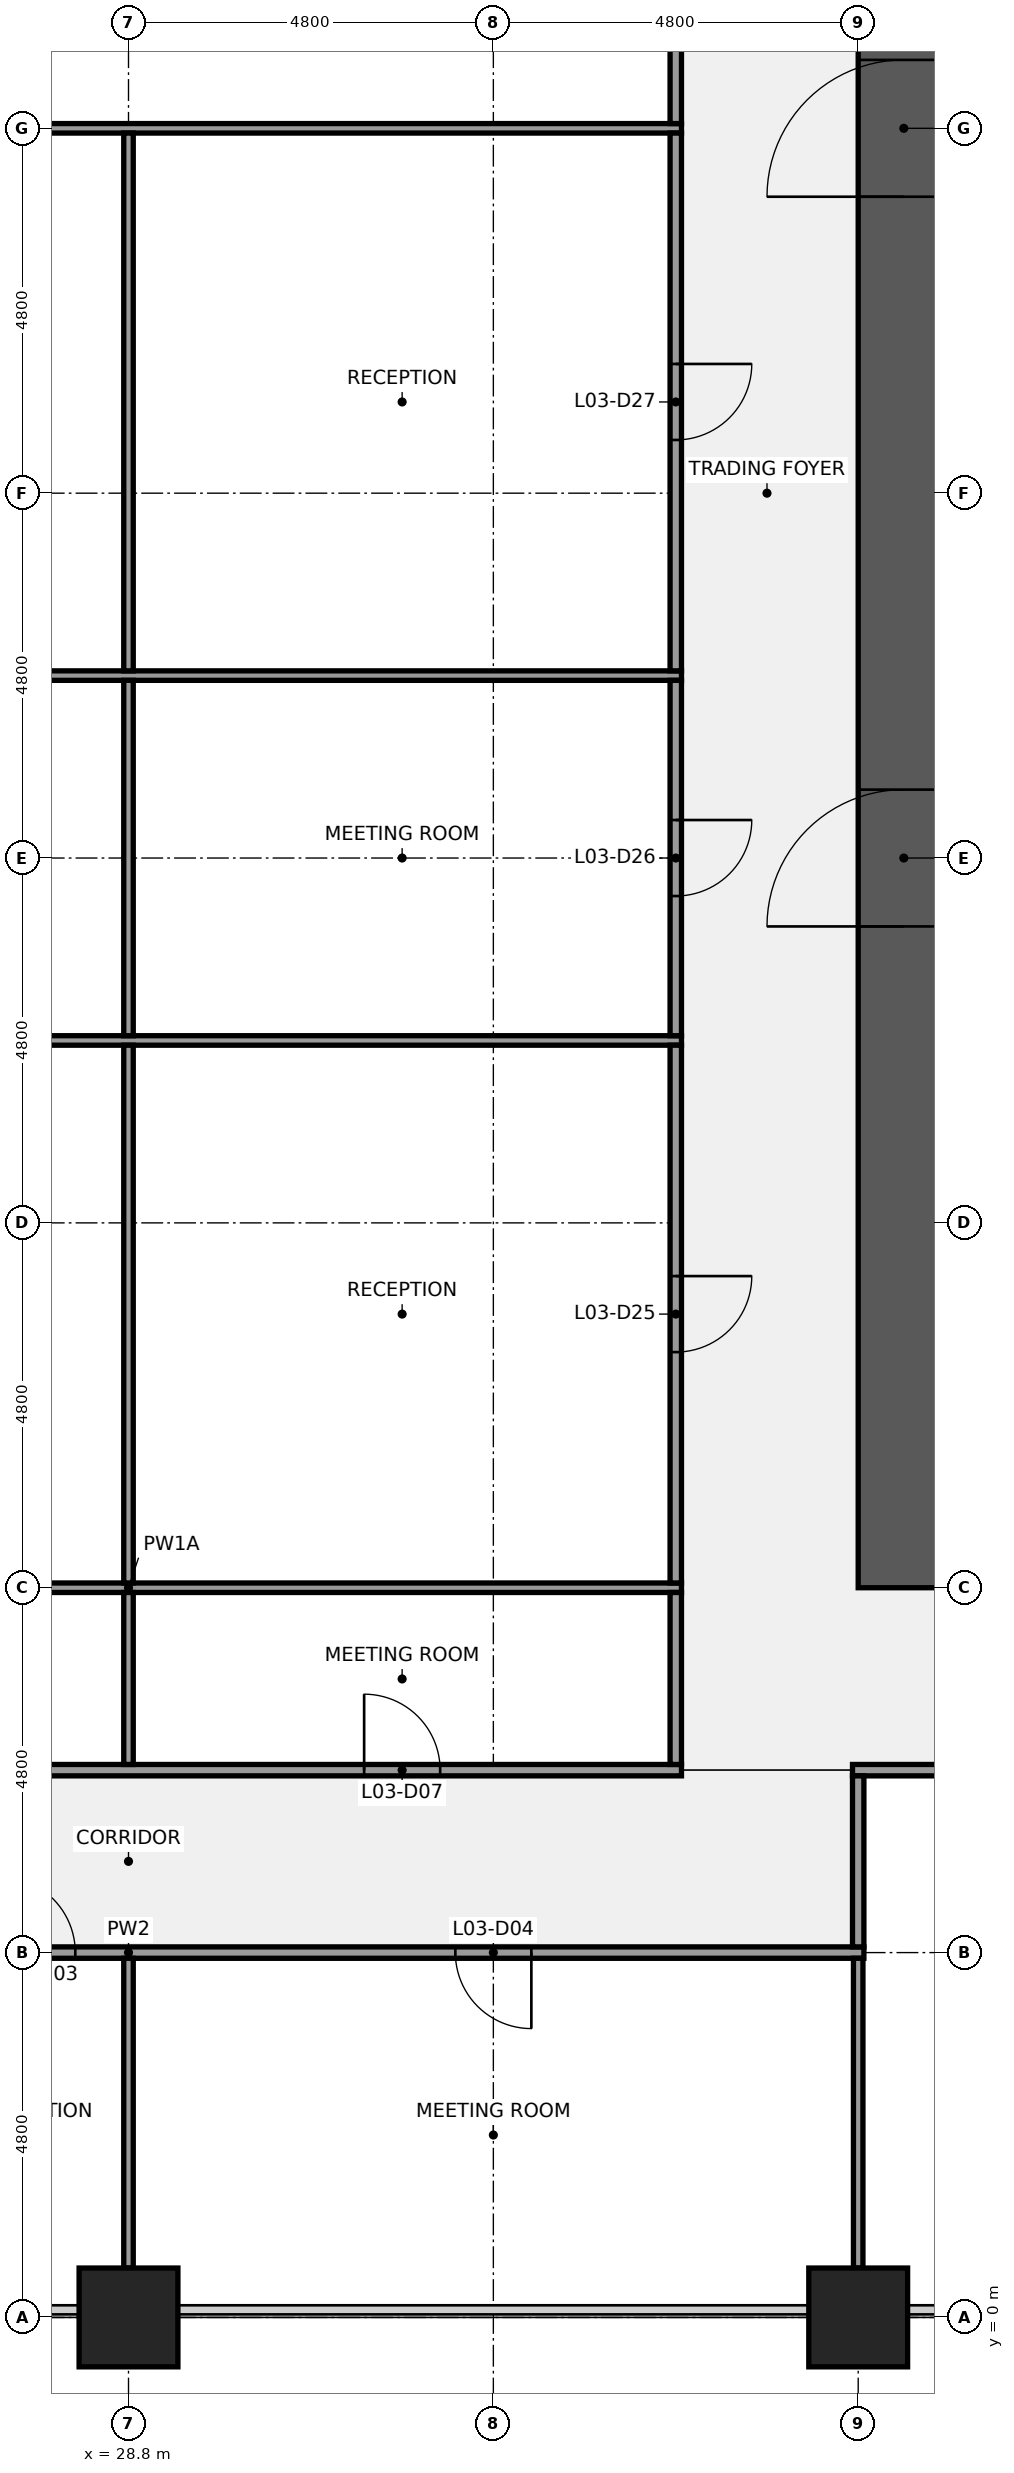
"""IFC4 building model, lengths in metres.
Left out: names, types, materials, properties, quantities, classifications, styles, units other than length and angle.
Written with IfcOpenShell. Run it as: python <this file> out.ifc"""

import sys

from ifc_helpers import new_model, si_unit, direction, frame, frame_2d, origin, origin_2d, place, context, subcontext, project, spatial, rectangle, extrude, element, fill, save


model = new_model("IFC4")
c1 = context("Model", 3, precision=1e-05, world=origin(), true_north=direction((0.0, 1.0)))
c2 = subcontext(c1, "Body", "Model", "MODEL_VIEW")
j1 = project(units=[si_unit("LENGTHUNIT", "METRE"), si_unit("PLANEANGLEUNIT", "RADIAN")], contexts=[c1])
p1 = place(None, origin())
s1 = spatial("IfcSite", under=j1, at=p1, CompositionType="ELEMENT")
p2 = place(p1, origin())
s2 = spatial("IfcBuilding", under=s1, at=p2, CompositionType="ELEMENT")
p3 = place(p2, frame((0.0, 0.0, 21.4)))
s3 = spatial("IfcBuildingStorey", under=s2, at=p3, CompositionType="ELEMENT", Elevation=21.4)
for number, where, z_axis, x_axis in (
    (1, (28.8, 0.0, 0.0), (0.0, 0.0, 1.0), (1.0, 0.0, 0.0)),
    (2, (38.4, 0.0, 0.0), (0.0, 0.0, 1.0), (1.0, 0.0, 0.0)),
):
    element("IfcColumn", number, at=place(p3, frame(where, z_axis=z_axis, x_axis=x_axis)), inside=s3, PredefinedType="COLUMN", context=c2, shape_type="SweptSolid", body=[
        extrude(rectangle(XDim=1.3, YDim=1.3, at=origin_2d()), origin(), (0.0, 0.0, 1.0), 4.4),
    ])
p4 = place(p3, frame((39.0, 9.6, 0.0), z_axis=(0.0, 0.0, 1.0), x_axis=(0.0, 1.0, 0.0)))
e3 = element("IfcWall", 3, at=p4, inside=s3, PredefinedType="SHEAR", context=c2, shape_type="SweptSolid", body=[
    extrude(rectangle(XDim=28.8, YDim=1.2, at=frame_2d((14.4, 0.0))), origin(), (0.0, 0.0, 1.0), 4.24),
])
p5 = place(p4, frame((8.7, 0.0, 0.0)))
e4 = element("IfcOpeningElement", 4, at=p5, cuts=e3, PredefinedType="OPENING", context=c2, shape_type="SweptSolid", body=[
    extrude(rectangle(XDim=1.8, YDim=2.1, at=frame_2d((0.9, 1.05))), frame((0.0, 0.61, 0.0), z_axis=(0.0, -1.0, 0.0), x_axis=(1.0, 0.0, 0.0)), (0.0, 0.0, 1.0), 1.22),
])
p6 = place(p4, frame((18.3, 0.0, 0.0)))
e5 = element("IfcOpeningElement", 5, at=p6, cuts=e3, PredefinedType="OPENING", context=c2, shape_type="SweptSolid", body=[
    extrude(rectangle(XDim=1.8, YDim=2.1, at=frame_2d((0.9, 1.05))), frame((0.0, 0.61, 0.0), z_axis=(0.0, -1.0, 0.0), x_axis=(1.0, 0.0, 0.0)), (0.0, 0.0, 1.0), 1.22),
])
p7 = place(p3, frame((19.125, 4.8, 0.0), z_axis=(0.0, 0.0, 1.0), x_axis=(1.0, 0.0, 0.0)))
e6 = element("IfcWall", 6, at=p7, inside=s3, PredefinedType="PARTITIONING", context=c2, shape_type="SweptSolid", body=[
    extrude(rectangle(XDim=19.35, YDim=0.15, at=frame_2d((9.675, 0.0))), origin(), (0.0, 0.0, 1.0), 3.27),
])
p8 = place(p7, frame((0.775, 0.0, 0.0)))
e7 = element("IfcOpeningElement", 7, at=p8, cuts=e6, PredefinedType="OPENING", context=c2, shape_type="SweptSolid", body=[
    extrude(rectangle(XDim=1.0, YDim=2.1, at=frame_2d((0.5, 1.05))), frame((0.0, 0.085, 0.0), z_axis=(0.0, -1.0, 0.0), x_axis=(1.0, 0.0, 0.0)), (0.0, 0.0, 1.0), 0.17),
])
p9 = place(p7, frame((4.375, 0.0, 0.0)))
e8 = element("IfcOpeningElement", 8, at=p9, cuts=e6, PredefinedType="OPENING", context=c2, shape_type="SweptSolid", body=[
    extrude(rectangle(XDim=1.0, YDim=2.1, at=frame_2d((0.5, 1.05))), frame((0.0, 0.085, 0.0), z_axis=(0.0, -1.0, 0.0), x_axis=(1.0, 0.0, 0.0)), (0.0, 0.0, 1.0), 0.17),
])
p10 = place(p7, frame((7.975, 0.0, 0.0)))
e9 = element("IfcOpeningElement", 9, at=p10, cuts=e6, PredefinedType="OPENING", context=c2, shape_type="SweptSolid", body=[
    extrude(rectangle(XDim=1.0, YDim=2.1, at=frame_2d((0.5, 1.05))), frame((0.0, 0.085, 0.0), z_axis=(0.0, -1.0, 0.0), x_axis=(1.0, 0.0, 0.0)), (0.0, 0.0, 1.0), 0.17),
])
p11 = place(p7, frame((13.975, 0.0, 0.0)))
e10 = element("IfcOpeningElement", 10, at=p11, cuts=e6, PredefinedType="OPENING", context=c2, shape_type="SweptSolid", body=[
    extrude(rectangle(XDim=1.0, YDim=2.1, at=frame_2d((0.5, 1.05))), frame((0.0, 0.085, 0.0), z_axis=(0.0, -1.0, 0.0), x_axis=(1.0, 0.0, 0.0)), (0.0, 0.0, 1.0), 0.17),
])
p12 = place(p3, frame((21.525, 7.2, 0.0), z_axis=(0.0, 0.0, 1.0), x_axis=(1.0, 0.0, 0.0)))
e11 = element("IfcWall", 11, at=p12, inside=s3, PredefinedType="PARTITIONING", context=c2, shape_type="SweptSolid", body=[
    extrude(rectangle(XDim=14.55, YDim=0.15, at=frame_2d((7.275, 0.0))), origin(), (0.0, 0.0, 1.0), 3.27),
])
p13 = place(p12, frame((3.175, 0.0, 0.0)))
e12 = element("IfcOpeningElement", 12, at=p13, cuts=e11, PredefinedType="OPENING", context=c2, shape_type="SweptSolid", body=[
    extrude(rectangle(XDim=1.0, YDim=2.1, at=frame_2d((0.5, 1.05))), frame((0.0, 0.085, 0.0), z_axis=(0.0, -1.0, 0.0), x_axis=(1.0, 0.0, 0.0)), (0.0, 0.0, 1.0), 0.17),
])
p14 = place(p12, frame((10.375, 0.0, 0.0)))
e13 = element("IfcOpeningElement", 13, at=p14, cuts=e11, PredefinedType="OPENING", context=c2, shape_type="SweptSolid", body=[
    extrude(rectangle(XDim=1.0, YDim=2.1, at=frame_2d((0.5, 1.05))), frame((0.0, 0.085, 0.0), z_axis=(0.0, -1.0, 0.0), x_axis=(1.0, 0.0, 0.0)), (0.0, 0.0, 1.0), 0.17),
])
p15 = place(p3, frame((38.325, 7.2, 0.0), z_axis=(0.0, 0.0, 1.0), x_axis=(1.0, 0.0, 0.0)))
e14 = element("IfcWall", 14, at=p15, inside=s3, PredefinedType="PARTITIONING", context=c2, shape_type="SweptSolid", body=[
    extrude(rectangle(XDim=4.95, YDim=0.15, at=frame_2d((2.475, 0.0))), origin(), (0.0, 0.0, 1.0), 3.27),
])
p16 = place(p15, frame((1.975, 0.0, 0.0)))
e15 = element("IfcOpeningElement", 15, at=p16, cuts=e14, PredefinedType="OPENING", context=c2, shape_type="SweptSolid", body=[
    extrude(rectangle(XDim=1.0, YDim=2.1, at=frame_2d((0.5, 1.05))), frame((0.0, 0.085, 0.0), z_axis=(0.0, -1.0, 0.0), x_axis=(1.0, 0.0, 0.0)), (0.0, 0.0, 1.0), 0.17),
])
for number, where, z_axis, x_axis in (
    (16, (21.525, 9.6, 0.0), (0.0, 0.0, 1.0), (1.0, 0.0, 0.0)),
    (17, (21.525, 16.8, 0.0), (0.0, 0.0, 1.0), (1.0, 0.0, 0.0)),
    (18, (21.525, 21.6, 0.0), (0.0, 0.0, 1.0), (1.0, 0.0, 0.0)),
    (19, (21.525, 28.8, 0.0), (0.0, 0.0, 1.0), (1.0, 0.0, 0.0)),
):
    element("IfcWall", number, at=place(p3, frame(where, z_axis=z_axis, x_axis=x_axis)), inside=s3, PredefinedType="PARTITIONING", context=c2, shape_type="SweptSolid", body=[
        extrude(rectangle(XDim=14.55, YDim=0.125, at=frame_2d((7.275, 0.0))), origin(), (0.0, 0.0, 1.0), 3.27),
    ])
p17 = place(p3, frame((28.8, 0.65, 0.0), z_axis=(0.0, 0.0, 1.0), x_axis=(0.0, 1.0, 0.0)))
e20 = element("IfcWall", 20, at=p17, inside=s3, PredefinedType="PARTITIONING", context=c2, shape_type="SweptSolid", body=[
    extrude(rectangle(XDim=4.075, YDim=0.125, at=frame_2d((2.038, 0.0))), origin(), (0.0, 0.0, 1.0), 3.27),
])
p18 = place(p3, frame((28.8, 7.275, 0.0), z_axis=(0.0, 0.0, 1.0), x_axis=(0.0, 1.0, 0.0)))
e21 = element("IfcWall", 21, at=p18, inside=s3, PredefinedType="PARTITIONING", context=c2, shape_type="SweptSolid", body=[
    extrude(rectangle(XDim=2.263, YDim=0.125, at=frame_2d((1.131, 0.0))), origin(), (0.0, 0.0, 1.0), 3.27),
])
p19 = place(p3, frame((28.8, 9.663, 0.0), z_axis=(0.0, 0.0, 1.0), x_axis=(0.0, 1.0, 0.0)))
e22 = element("IfcWall", 22, at=p19, inside=s3, PredefinedType="PARTITIONING", context=c2, shape_type="SweptSolid", body=[
    extrude(rectangle(XDim=7.075, YDim=0.125, at=frame_2d((3.538, 0.0))), origin(), (0.0, 0.0, 1.0), 3.27),
])
p20 = place(p3, frame((28.8, 16.863, 0.0), z_axis=(0.0, 0.0, 1.0), x_axis=(0.0, 1.0, 0.0)))
e23 = element("IfcWall", 23, at=p20, inside=s3, PredefinedType="PARTITIONING", context=c2, shape_type="SweptSolid", body=[
    extrude(rectangle(XDim=4.675, YDim=0.125, at=frame_2d((2.337, 0.0))), origin(), (0.0, 0.0, 1.0), 3.27),
])
p21 = place(p3, frame((28.8, 21.663, 0.0), z_axis=(0.0, 0.0, 1.0), x_axis=(0.0, 1.0, 0.0)))
e24 = element("IfcWall", 24, at=p21, inside=s3, PredefinedType="PARTITIONING", context=c2, shape_type="SweptSolid", body=[
    extrude(rectangle(XDim=7.075, YDim=0.125, at=frame_2d((3.538, 0.0))), origin(), (0.0, 0.0, 1.0), 3.27),
])
p22 = place(p3, frame((36.0, 7.275, 0.0), z_axis=(0.0, 0.0, 1.0), x_axis=(0.0, 1.0, 0.0)))
e25 = element("IfcWall", 25, at=p22, inside=s3, PredefinedType="PARTITIONING", context=c2, shape_type="SweptSolid", body=[
    extrude(rectangle(XDim=2.263, YDim=0.15, at=frame_2d((1.131, 0.0))), origin(), (0.0, 0.0, 1.0), 3.27),
])
p23 = place(p3, frame((36.0, 9.663, 0.0), z_axis=(0.0, 0.0, 1.0), x_axis=(0.0, 1.0, 0.0)))
e26 = element("IfcWall", 26, at=p23, inside=s3, PredefinedType="PARTITIONING", context=c2, shape_type="SweptSolid", body=[
    extrude(rectangle(XDim=7.075, YDim=0.15, at=frame_2d((3.538, 0.0))), origin(), (0.0, 0.0, 1.0), 3.27),
])
p24 = place(p23, frame((3.038, 0.0, 0.0)))
e27 = element("IfcOpeningElement", 27, at=p24, cuts=e26, PredefinedType="OPENING", context=c2, shape_type="SweptSolid", body=[
    extrude(rectangle(XDim=1.0, YDim=2.1, at=frame_2d((0.5, 1.05))), frame((0.0, 0.085, 0.0), z_axis=(0.0, -1.0, 0.0), x_axis=(1.0, 0.0, 0.0)), (0.0, 0.0, 1.0), 0.17),
])
p25 = place(p3, frame((36.0, 16.863, 0.0), z_axis=(0.0, 0.0, 1.0), x_axis=(0.0, 1.0, 0.0)))
e28 = element("IfcWall", 28, at=p25, inside=s3, PredefinedType="PARTITIONING", context=c2, shape_type="SweptSolid", body=[
    extrude(rectangle(XDim=4.675, YDim=0.15, at=frame_2d((2.337, 0.0))), origin(), (0.0, 0.0, 1.0), 3.27),
])
p26 = place(p25, frame((1.837, 0.0, 0.0)))
e29 = element("IfcOpeningElement", 29, at=p26, cuts=e28, PredefinedType="OPENING", context=c2, shape_type="SweptSolid", body=[
    extrude(rectangle(XDim=1.0, YDim=2.1, at=frame_2d((0.5, 1.05))), frame((0.0, 0.085, 0.0), z_axis=(0.0, -1.0, 0.0), x_axis=(1.0, 0.0, 0.0)), (0.0, 0.0, 1.0), 0.17),
])
p27 = place(p3, frame((36.0, 21.663, 0.0), z_axis=(0.0, 0.0, 1.0), x_axis=(0.0, 1.0, 0.0)))
e30 = element("IfcWall", 30, at=p27, inside=s3, PredefinedType="PARTITIONING", context=c2, shape_type="SweptSolid", body=[
    extrude(rectangle(XDim=7.075, YDim=0.15, at=frame_2d((3.538, 0.0))), origin(), (0.0, 0.0, 1.0), 3.27),
])
p28 = place(p27, frame((3.038, 0.0, 0.0)))
e31 = element("IfcOpeningElement", 31, at=p28, cuts=e30, PredefinedType="OPENING", context=c2, shape_type="SweptSolid", body=[
    extrude(rectangle(XDim=1.0, YDim=2.1, at=frame_2d((0.5, 1.05))), frame((0.0, 0.085, 0.0), z_axis=(0.0, -1.0, 0.0), x_axis=(1.0, 0.0, 0.0)), (0.0, 0.0, 1.0), 0.17),
])
p29 = place(p3, frame((36.0, 28.863, 0.0), z_axis=(0.0, 0.0, 1.0), x_axis=(0.0, 1.0, 0.0)))
e32 = element("IfcWall", 32, at=p29, inside=s3, PredefinedType="PARTITIONING", context=c2, shape_type="SweptSolid", body=[
    extrude(rectangle(XDim=4.675, YDim=0.15, at=frame_2d((2.337, 0.0))), origin(), (0.0, 0.0, 1.0), 3.27),
])
p30 = place(p3, frame((38.4, 0.65, 0.0), z_axis=(0.0, 0.0, 1.0), x_axis=(0.0, 1.0, 0.0)))
e33 = element("IfcWall", 33, at=p30, inside=s3, PredefinedType="PARTITIONING", context=c2, shape_type="SweptSolid", body=[
    extrude(rectangle(XDim=4.075, YDim=0.125, at=frame_2d((2.038, 0.0))), origin(), (0.0, 0.0, 1.0), 3.27),
])
p31 = place(p3, frame((38.4, 4.875, 0.0), z_axis=(0.0, 0.0, 1.0), x_axis=(0.0, 1.0, 0.0)))
e34 = element("IfcWall", 34, at=p31, inside=s3, PredefinedType="PARTITIONING", context=c2, shape_type="SweptSolid", body=[
    extrude(rectangle(XDim=2.25, YDim=0.15, at=frame_2d((1.125, 0.0))), origin(), (0.0, 0.0, 1.0), 3.27),
])
p32 = place(p3, frame((38.4, -1.075, 0.0), z_axis=(0.0, 0.0, 1.0), x_axis=(1.0, 0.0, 0.0)))
e35 = element("IfcColumn", 35, at=p32, inside=s3, PredefinedType="PILASTER", context=c2, shape_type="SweptSolid", body=[
    extrude(rectangle(XDim=4.2, YDim=0.85, at=origin_2d()), origin(), (0.0, 0.0, 1.0), 4.4),
])
p33 = place(p5, origin())
e36 = element("IfcDoor", 36, at=p33, inside=s3, OperationType="DOUBLE_DOOR_SINGLE_SWING", PredefinedType="DOOR", context=c2, shape_type="SweptSolid", body=[
    extrude(rectangle(XDim=1.8, YDim=2.1, at=frame_2d((0.9, 1.05))), frame((0.0, 0.025, 0.0), z_axis=(0.0, -1.0, 0.0), x_axis=(1.0, 0.0, 0.0)), (0.0, 0.0, 1.0), 0.05),
])
fill(e4, e36)
p34 = place(p6, origin())
e37 = element("IfcDoor", 37, at=p34, inside=s3, OperationType="DOUBLE_DOOR_SINGLE_SWING", PredefinedType="DOOR", context=c2, shape_type="SweptSolid", body=[
    extrude(rectangle(XDim=1.8, YDim=2.1, at=frame_2d((0.9, 1.05))), frame((0.0, 0.025, 0.0), z_axis=(0.0, -1.0, 0.0), x_axis=(1.0, 0.0, 0.0)), (0.0, 0.0, 1.0), 0.05),
])
fill(e5, e37)
p35 = place(p10, origin())
e38 = element("IfcDoor", 38, at=p35, inside=s3, OperationType="SINGLE_SWING_LEFT", PredefinedType="DOOR", context=c2, shape_type="SweptSolid", body=[
    extrude(rectangle(XDim=1.0, YDim=2.1, at=frame_2d((0.5, 1.05))), frame((0.0, 0.025, 0.0), z_axis=(0.0, -1.0, 0.0), x_axis=(1.0, 0.0, 0.0)), (0.0, 0.0, 1.0), 0.05),
])
fill(e9, e38)
p36 = place(p11, origin())
e39 = element("IfcDoor", 39, at=p36, inside=s3, OperationType="SINGLE_SWING_RIGHT", PredefinedType="DOOR", context=c2, shape_type="SweptSolid", body=[
    extrude(rectangle(XDim=1.0, YDim=2.1, at=frame_2d((0.5, 1.05))), frame((0.0, 0.025, 0.0), z_axis=(0.0, -1.0, 0.0), x_axis=(1.0, 0.0, 0.0)), (0.0, 0.0, 1.0), 0.05),
])
fill(e10, e39)
p37 = place(p14, origin())
e40 = element("IfcDoor", 40, at=p37, inside=s3, OperationType="SINGLE_SWING_LEFT", PredefinedType="DOOR", context=c2, shape_type="SweptSolid", body=[
    extrude(rectangle(XDim=1.0, YDim=2.1, at=frame_2d((0.5, 1.05))), frame((0.0, 0.025, 0.0), z_axis=(0.0, -1.0, 0.0), x_axis=(1.0, 0.0, 0.0)), (0.0, 0.0, 1.0), 0.05),
])
fill(e13, e40)
p38 = place(p24, origin())
e41 = element("IfcDoor", 41, at=p38, inside=s3, OperationType="SINGLE_SWING_RIGHT", PredefinedType="DOOR", context=c2, shape_type="SweptSolid", body=[
    extrude(rectangle(XDim=1.0, YDim=2.1, at=frame_2d((0.5, 1.05))), frame((0.0, 0.025, 0.0), z_axis=(0.0, -1.0, 0.0), x_axis=(1.0, 0.0, 0.0)), (0.0, 0.0, 1.0), 0.05),
])
fill(e27, e41)
p39 = place(p26, origin())
e42 = element("IfcDoor", 42, at=p39, inside=s3, OperationType="SINGLE_SWING_RIGHT", PredefinedType="DOOR", context=c2, shape_type="SweptSolid", body=[
    extrude(rectangle(XDim=1.0, YDim=2.1, at=frame_2d((0.5, 1.05))), frame((0.0, 0.025, 0.0), z_axis=(0.0, -1.0, 0.0), x_axis=(1.0, 0.0, 0.0)), (0.0, 0.0, 1.0), 0.05),
])
fill(e29, e42)
p40 = place(p28, origin())
e43 = element("IfcDoor", 43, at=p40, inside=s3, OperationType="SINGLE_SWING_RIGHT", PredefinedType="DOOR", context=c2, shape_type="SweptSolid", body=[
    extrude(rectangle(XDim=1.0, YDim=2.1, at=frame_2d((0.5, 1.05))), frame((0.0, 0.025, 0.0), z_axis=(0.0, -1.0, 0.0), x_axis=(1.0, 0.0, 0.0)), (0.0, 0.0, 1.0), 0.05),
])
fill(e31, e43)
save(model, sys.argv[1])
